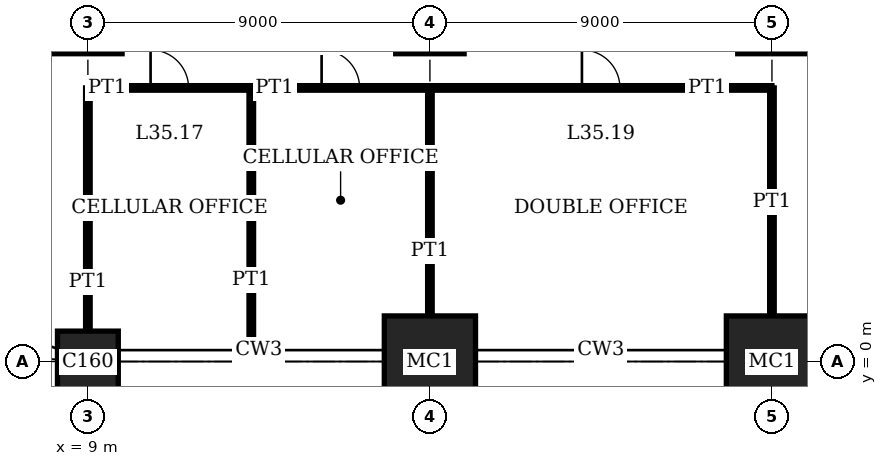
"""IFC4 building model, lengths in metres.
Left out: names, types, materials, properties, quantities, classifications, styles, units other than length and angle.
Written with IfcOpenShell. Run it as: python <this file> out.ifc"""

import sys

from ifc_helpers import new_model, si_unit, direction, frame, frame_2d, origin, origin_2d, place, context, subcontext, project, spatial, rectangle, extrude, element, fill, save


model = new_model("IFC4")
c1 = context("Model", 3, precision=1e-05, world=origin(), true_north=direction((0.0, 1.0)))
c2 = subcontext(c1, "Body", "Model", "MODEL_VIEW")
j1 = project(units=[si_unit("LENGTHUNIT", "METRE"), si_unit("PLANEANGLEUNIT", "RADIAN")], contexts=[c1])
p1 = place(None, origin())
s1 = spatial("IfcSite", under=j1, at=p1, CompositionType="ELEMENT")
p2 = place(p1, origin())
s2 = spatial("IfcBuilding", under=s1, at=p2, CompositionType="ELEMENT")
p3 = place(p2, frame((0.0, 0.0, 145.0)))
s3 = spatial("IfcBuildingStorey", under=s2, at=p3, CompositionType="ELEMENT", Elevation=145.0)
p4 = place(p3, frame((9.0, 0.0, 0.0), z_axis=(0.0, 0.0, 1.0), x_axis=(1.0, 0.0, 0.0)))
e1 = element("IfcColumn", 1, at=p4, inside=s3, PredefinedType="COLUMN", context=c2, shape_type="SweptSolid", body=[
    extrude(rectangle(XDim=1.6, YDim=1.6, at=origin_2d()), origin(), (0.0, 0.0, 1.0), 4.0),
])
p5 = place(p3, frame((9.0, 9.0, 0.0), z_axis=(0.0, 0.0, 1.0), x_axis=(1.0, 0.0, 0.0)))
e2 = element("IfcColumn", 2, at=p5, inside=s3, PredefinedType="COLUMN", context=c2, shape_type="SweptSolid", body=[
    extrude(rectangle(XDim=1.8, YDim=1.8, at=origin_2d()), origin(), (0.0, 0.0, 1.0), 4.0),
])
p6 = place(p3, frame((18.0, 0.0, 0.0), z_axis=(0.0, 0.0, 1.0), x_axis=(1.0, 0.0, 0.0)))
e3 = element("IfcColumn", 3, at=p6, inside=s3, PredefinedType="COLUMN", context=c2, shape_type="SweptSolid", body=[
    extrude(rectangle(XDim=2.4, YDim=2.4, at=origin_2d()), origin(), (0.0, 0.0, 1.0), 4.0),
])
p7 = place(p3, frame((18.0, 9.0, 0.0), z_axis=(0.0, 0.0, 1.0), x_axis=(1.0, 0.0, 0.0)))
e4 = element("IfcColumn", 4, at=p7, inside=s3, PredefinedType="COLUMN", context=c2, shape_type="SweptSolid", body=[
    extrude(rectangle(XDim=1.8, YDim=1.8, at=origin_2d()), origin(), (0.0, 0.0, 1.0), 4.0),
])
p8 = place(p3, frame((27.0, 0.0, 0.0), z_axis=(0.0, 0.0, 1.0), x_axis=(1.0, 0.0, 0.0)))
e5 = element("IfcColumn", 5, at=p8, inside=s3, PredefinedType="COLUMN", context=c2, shape_type="SweptSolid", body=[
    extrude(rectangle(XDim=2.4, YDim=2.4, at=origin_2d()), origin(), (0.0, 0.0, 1.0), 4.0),
])
p9 = place(p3, frame((27.0, 9.0, 0.0), z_axis=(0.0, 0.0, 1.0), x_axis=(1.0, 0.0, 0.0)))
e6 = element("IfcColumn", 6, at=p9, inside=s3, PredefinedType="COLUMN", context=c2, shape_type="SweptSolid", body=[
    extrude(rectangle(XDim=1.8, YDim=1.8, at=origin_2d()), origin(), (0.0, 0.0, 1.0), 4.0),
])
p10 = place(p3, frame((9.0, 7.2, 0.0), z_axis=(0.0, 0.0, 1.0), x_axis=(1.0, 0.0, 0.0)))
e7 = element("IfcWall", 7, at=p10, inside=s3, PredefinedType="PARTITIONING", context=c2, shape_type="SweptSolid", body=[
    extrude(rectangle(XDim=4.3, YDim=0.12, at=frame_2d((2.15, 0.0))), origin(), (0.0, 0.0, 1.0), 3.75),
])
p11 = place(p10, frame((1.65, 0.0, 0.0)))
e8 = element("IfcOpeningElement", 8, at=p11, cuts=e7, PredefinedType="OPENING", context=c2, shape_type="SweptSolid", body=[
    extrude(rectangle(XDim=1.0, YDim=2.4, at=frame_2d((0.5, 1.2))), frame((0.0, 0.07, 0.0), z_axis=(0.0, -1.0, 0.0), x_axis=(1.0, 0.0, 0.0)), (0.0, 0.0, 1.0), 0.14),
])
p12 = place(p3, frame((13.3, 7.2, 0.0), z_axis=(0.0, 0.0, 1.0), x_axis=(1.0, 0.0, 0.0)))
e9 = element("IfcWall", 9, at=p12, inside=s3, PredefinedType="PARTITIONING", context=c2, shape_type="SweptSolid", body=[
    extrude(rectangle(XDim=4.7, YDim=0.12, at=frame_2d((2.35, 0.0))), origin(), (0.0, 0.0, 1.0), 3.75),
])
p13 = place(p12, frame((1.85, 0.0, 0.0)))
e10 = element("IfcOpeningElement", 10, at=p13, cuts=e9, PredefinedType="OPENING", context=c2, shape_type="SweptSolid", body=[
    extrude(rectangle(XDim=1.0, YDim=2.4, at=frame_2d((0.5, 1.2))), frame((0.0, 0.07, 0.0), z_axis=(0.0, -1.0, 0.0), x_axis=(1.0, 0.0, 0.0)), (0.0, 0.0, 1.0), 0.14),
])
p14 = place(p3, frame((18.0, 7.2, 0.0), z_axis=(0.0, 0.0, 1.0), x_axis=(1.0, 0.0, 0.0)))
e11 = element("IfcWall", 11, at=p14, inside=s3, PredefinedType="PARTITIONING", context=c2, shape_type="SweptSolid", body=[
    extrude(rectangle(XDim=9.0, YDim=0.12, at=frame_2d((4.5, 0.0))), origin(), (0.0, 0.0, 1.0), 3.75),
])
p15 = place(p14, frame((4.0, 0.0, 0.0)))
e12 = element("IfcOpeningElement", 12, at=p15, cuts=e11, PredefinedType="OPENING", context=c2, shape_type="SweptSolid", body=[
    extrude(rectangle(XDim=1.0, YDim=2.4, at=frame_2d((0.5, 1.2))), frame((0.0, 0.07, 0.0), z_axis=(0.0, -1.0, 0.0), x_axis=(1.0, 0.0, 0.0)), (0.0, 0.0, 1.0), 0.14),
])
p16 = place(p3, frame((9.0, 0.8, 0.0), z_axis=(0.0, 0.0, 1.0), x_axis=(0.0, 1.0, 0.0)))
e13 = element("IfcWall", 13, at=p16, inside=s3, PredefinedType="PARTITIONING", context=c2, shape_type="SweptSolid", body=[
    extrude(rectangle(XDim=6.4, YDim=0.12, at=frame_2d((3.2, 0.0))), origin(), (0.0, 0.0, 1.0), 3.05),
])
p17 = place(p3, frame((13.3, 0.31, 0.0), z_axis=(0.0, 0.0, 1.0), x_axis=(0.0, 1.0, 0.0)))
e14 = element("IfcWall", 14, at=p17, inside=s3, PredefinedType="PARTITIONING", context=c2, shape_type="SweptSolid", body=[
    extrude(rectangle(XDim=6.89, YDim=0.12, at=frame_2d((3.445, 0.0))), origin(), (0.0, 0.0, 1.0), 3.75),
])
for number, where, z_axis, x_axis in (
    (15, (18.0, 1.2, 0.0), (0.0, 0.0, 1.0), (0.0, 1.0, 0.0)),
    (16, (27.0, 1.2, 0.0), (0.0, 0.0, 1.0), (0.0, 1.0, 0.0)),
):
    element("IfcWall", number, at=place(p3, frame(where, z_axis=z_axis, x_axis=x_axis)), inside=s3, PredefinedType="PARTITIONING", context=c2, shape_type="SweptSolid", body=[
        extrude(rectangle(XDim=6.0, YDim=0.12, at=frame_2d((3.0, 0.0))), origin(), (0.0, 0.0, 1.0), 3.05),
    ])
p18 = place(p11, origin())
e17 = element("IfcDoor", 17, at=p18, inside=s3, OperationType="SINGLE_SWING_RIGHT", PredefinedType="DOOR", context=c2, shape_type="SweptSolid", body=[
    extrude(rectangle(XDim=1.0, YDim=2.4, at=frame_2d((0.5, 1.2))), frame((0.0, 0.025, 0.0), z_axis=(0.0, -1.0, 0.0), x_axis=(1.0, 0.0, 0.0)), (0.0, 0.0, 1.0), 0.05),
])
fill(e8, e17)
p19 = place(p13, origin())
e18 = element("IfcDoor", 18, at=p19, inside=s3, OperationType="SINGLE_SWING_RIGHT", PredefinedType="DOOR", context=c2, shape_type="SweptSolid", body=[
    extrude(rectangle(XDim=1.0, YDim=2.4, at=frame_2d((0.5, 1.2))), frame((0.0, 0.025, 0.0), z_axis=(0.0, -1.0, 0.0), x_axis=(1.0, 0.0, 0.0)), (0.0, 0.0, 1.0), 0.05),
])
fill(e10, e18)
p20 = place(p15, origin())
e19 = element("IfcDoor", 19, at=p20, inside=s3, OperationType="SINGLE_SWING_RIGHT", PredefinedType="DOOR", context=c2, shape_type="SweptSolid", body=[
    extrude(rectangle(XDim=1.0, YDim=2.4, at=frame_2d((0.5, 1.2))), frame((0.0, 0.025, 0.0), z_axis=(0.0, -1.0, 0.0), x_axis=(1.0, 0.0, 0.0)), (0.0, 0.0, 1.0), 0.05),
])
fill(e12, e19)
save(model, sys.argv[1])
